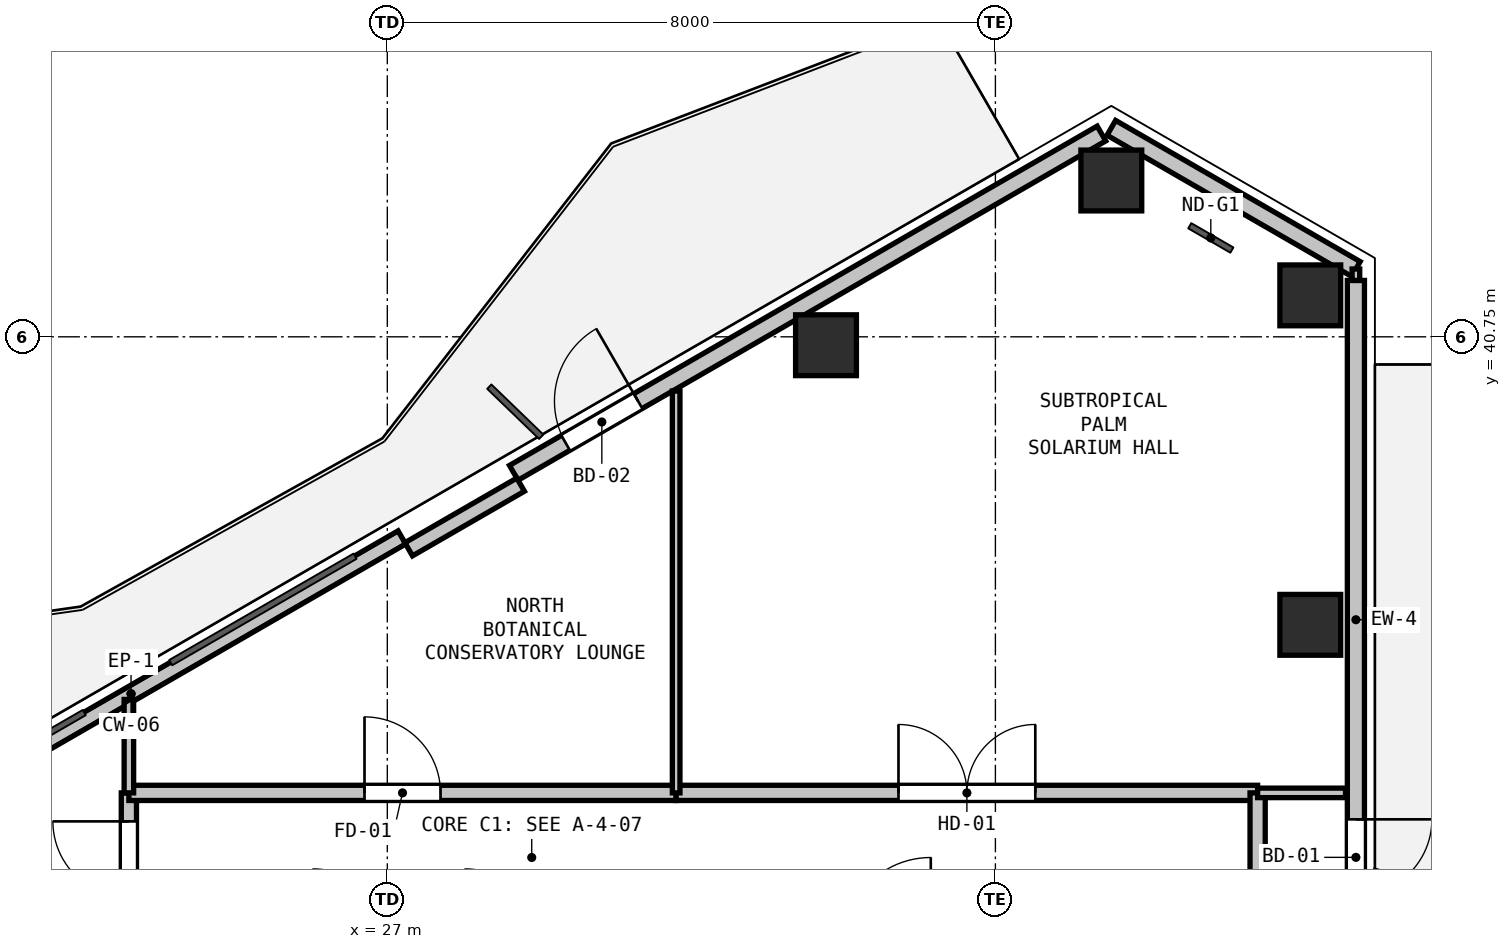
"""IFC4 building model, lengths in metres.
Left out: names, types, materials, properties, quantities, classifications, styles, units other than length and angle.
Written with IfcOpenShell. Run it as: python <this file> out.ifc"""

import sys

from ifc_helpers import new_model, si_unit, direction, frame, frame_2d, origin, origin_2d, place, context, subcontext, project, spatial, rectangle, hollow_rectangle, extrude, element, fill, save


model = new_model("IFC4")
c1 = context("Model", 3, precision=1e-05, world=origin(), true_north=direction((0.0, 1.0)))
c2 = subcontext(c1, "Body", "Model", "MODEL_VIEW")
j1 = project(units=[si_unit("LENGTHUNIT", "METRE"), si_unit("PLANEANGLEUNIT", "RADIAN")], contexts=[c1])
p1 = place(None, origin())
s1 = spatial("IfcSite", under=j1, at=p1, CompositionType="ELEMENT")
p2 = place(p1, origin())
s2 = spatial("IfcBuilding", under=s1, at=p2, CompositionType="ELEMENT")
p3 = place(p2, frame((0.0, 0.0, 249.6)))
s3 = spatial("IfcBuildingStorey", under=s2, at=p3, CompositionType="ELEMENT", Elevation=249.6)
for number, where, z_axis, x_axis in (
    (1, (32.771, 40.639, 0.0), (0.0, 0.0, 1.0), (1.0, 0.0, 0.0)),
    (2, (36.525, 42.807, 0.0), (0.0, 0.0, 1.0), (1.0, 0.0, 0.0)),
    (3, (39.143, 41.295, 0.0), (0.0, 0.0, 1.0), (1.0, 0.0, 0.0)),
    (4, (39.143, 36.961, 0.0), (0.0, 0.0, 1.0), (1.0, 0.0, 0.0)),
):
    element("IfcColumn", number, at=place(p3, frame(where, z_axis=z_axis, x_axis=x_axis)), inside=s3, PredefinedType="COLUMN", context=c2, shape_type="SweptSolid", body=[
        extrude(hollow_rectangle(XDim=0.8, YDim=0.8, WallThickness=0.025, at=origin_2d()), origin(), (0.0, 0.0, 1.0), 4.5),
    ])
p4 = place(p3, frame((36.525, 43.5, 0.0), z_axis=(0.0, 0.0, 1.0), x_axis=(0.866038962515, -0.499976514854, 0.0)))
e5 = element("IfcWall", 5, at=p4, inside=s3, PredefinedType="SOLIDWALL", context=c2, shape_type="SweptSolid", body=[
    extrude(rectangle(XDim=3.716, YDim=0.225, at=frame_2d((1.858, 0.0))), origin(), (0.0, 0.0, 1.0), 3.84),
])
p5 = place(p3, frame((20.066, 33.997, 0.0), z_axis=(0.0, 0.0, 1.0), x_axis=(0.866019557082, 0.500010126649, 0.0)))
e6 = element("IfcWall", 6, at=p5, inside=s3, PredefinedType="PARAPET", context=c2, shape_type="SweptSolid", body=[
    extrude(rectangle(XDim=8.228, YDim=0.2, at=frame_2d((4.114, 0.0))), origin(), (0.0, 0.0, 1.0), 0.2),
])
p6 = place(p3, frame((28.664, 38.96, 0.0), z_axis=(0.0, 0.0, 1.0), x_axis=(0.866026655105, 0.499997832642, 0.0)))
e7 = element("IfcWall", 7, at=p6, inside=s3, PredefinedType="SOLIDWALL", context=c2, shape_type="SweptSolid", body=[
    extrude(rectangle(XDim=8.928, YDim=0.225, at=frame_2d((4.464, 0.0))), origin(), (0.0, 0.0, 1.0), 3.84),
])
p7 = place(p6, frame((0.788, 0.0, 0.0)))
e8 = element("IfcOpeningElement", 8, at=p7, cuts=e7, PredefinedType="OPENING", context=c2, shape_type="SweptSolid", body=[
    extrude(rectangle(XDim=1.1, YDim=2.1, at=frame_2d((0.55, 1.05))), frame((0.0, 0.123, 0.0), z_axis=(0.0, -1.0, 0.0), x_axis=(1.0, 0.0, 0.0)), (0.0, 0.0, 1.0), 0.245),
])
p8 = place(p3, frame((27.281, 37.955, 0.0), z_axis=(0.0, 0.0, 1.0), x_axis=(0.866025371046, 0.500000056704, 0.0)))
e9 = element("IfcWall", 9, at=p8, inside=s3, PredefinedType="PARAPET", context=c2, shape_type="SweptSolid", body=[
    extrude(rectangle(XDim=1.7, YDim=0.2, at=frame_2d((0.85, 0.0))), origin(), (0.0, 0.0, 1.0), 3.84),
])
p9 = place(p3, frame((39.743, 41.492, 0.0), z_axis=(0.0, 0.0, 1.0), x_axis=(0.0, -1.0, 0.0)))
e10 = element("IfcWall", 10, at=p9, inside=s3, PredefinedType="SOLIDWALL", context=c2, shape_type="SweptSolid", body=[
    extrude(rectangle(XDim=8.928, YDim=0.225, at=frame_2d((4.464, 0.0))), origin(), (0.0, 0.0, 1.0), 3.84),
])
p10 = place(p9, frame((7.09, 0.0, 0.0)))
e11 = element("IfcOpeningElement", 11, at=p10, cuts=e10, PredefinedType="OPENING", context=c2, shape_type="SweptSolid", body=[
    extrude(rectangle(XDim=1.0, YDim=2.1, at=frame_2d((0.5, 1.05))), frame((0.0, 0.123, 0.0), z_axis=(0.0, -1.0, 0.0), x_axis=(1.0, 0.0, 0.0)), (0.0, 0.0, 1.0), 0.245),
])
p11 = place(p3, frame((23.6, 33.0, 0.0), z_axis=(0.0, 0.0, 1.0), x_axis=(0.0, 1.0, 0.0)))
e12 = element("IfcWall", 12, at=p11, inside=s3, PredefinedType="PARTITIONING", context=c2, shape_type="SweptSolid", body=[
    extrude(rectangle(XDim=1.75, YDim=0.2, at=frame_2d((0.875, 0.0))), origin(), (0.0, 0.0, 1.0), 3.745),
])
p12 = place(p11, frame((0.375, 0.0, 0.0)))
e13 = element("IfcOpeningElement", 13, at=p12, cuts=e12, PredefinedType="OPENING", context=c2, shape_type="SweptSolid", body=[
    extrude(rectangle(XDim=1.0, YDim=2.15, at=frame_2d((0.5, 1.075))), frame((0.0, 0.11, 0.0), z_axis=(0.0, -1.0, 0.0), x_axis=(1.0, 0.0, 0.0)), (0.0, 0.0, 1.0), 0.22),
])
p13 = place(p3, frame((23.6, 34.75, 0.0), z_axis=(0.0, 0.0, 1.0), x_axis=(1.0, 0.0, 0.0)))
e14 = element("IfcWall", 14, at=p13, inside=s3, PredefinedType="PARTITIONING", context=c2, shape_type="SweptSolid", body=[
    extrude(rectangle(XDim=7.2, YDim=0.2, at=frame_2d((3.6, 0.0))), origin(), (0.0, 0.0, 1.0), 4.22),
])
p14 = place(p13, frame((3.1, 0.0, 0.0)))
e15 = element("IfcOpeningElement", 15, at=p14, cuts=e14, PredefinedType="OPENING", context=c2, shape_type="SweptSolid", body=[
    extrude(rectangle(XDim=1.0, YDim=2.15, at=frame_2d((0.5, 1.075))), frame((0.0, 0.11, 0.0), z_axis=(0.0, -1.0, 0.0), x_axis=(1.0, 0.0, 0.0)), (0.0, 0.0, 1.0), 0.22),
])
p15 = place(p3, frame((30.8, 34.75, 0.0), z_axis=(0.0, 0.0, 1.0), x_axis=(1.0, 0.0, 0.0)))
e16 = element("IfcWall", 16, at=p15, inside=s3, PredefinedType="PARTITIONING", context=c2, shape_type="SweptSolid", body=[
    extrude(rectangle(XDim=7.65, YDim=0.2, at=frame_2d((3.825, 0.0))), origin(), (0.0, 0.0, 1.0), 3.668),
])
p16 = place(p15, frame((2.925, 0.0, 0.0)))
e17 = element("IfcOpeningElement", 17, at=p16, cuts=e16, PredefinedType="OPENING", context=c2, shape_type="SweptSolid", body=[
    extrude(rectangle(XDim=1.8, YDim=2.2, at=frame_2d((0.9, 1.1))), frame((0.0, 0.11, 0.0), z_axis=(0.0, -1.0, 0.0), x_axis=(1.0, 0.0, 0.0)), (0.0, 0.0, 1.0), 0.22),
])
p17 = place(p3, frame((38.45, 34.75, 0.0), z_axis=(0.0, 0.0, 1.0), x_axis=(0.0, -1.0, 0.0)))
e18 = element("IfcWall", 18, at=p17, inside=s3, PredefinedType="PARTITIONING", context=c2, shape_type="SweptSolid", body=[
    extrude(rectangle(XDim=16.0, YDim=0.2, at=frame_2d((8.0, 0.0))), origin(), (0.0, 0.0, 1.0), 4.22),
])
p18 = place(p17, frame((7.1, 0.0, 0.0)))
e19 = element("IfcOpeningElement", 19, at=p18, cuts=e18, PredefinedType="OPENING", context=c2, shape_type="SweptSolid", body=[
    extrude(rectangle(XDim=1.8, YDim=2.2, at=frame_2d((0.9, 1.1))), frame((0.0, 0.11, 0.0), z_axis=(0.0, -1.0, 0.0), x_axis=(1.0, 0.0, 0.0)), (0.0, 0.0, 1.0), 0.22),
])
p19 = place(p3, frame((23.6, 34.75, 0.0), z_axis=(0.0, 0.0, 1.0), x_axis=(0.0, 1.0, 0.0)))
e20 = element("IfcWall", 20, at=p19, inside=s3, PredefinedType="PARTITIONING", context=c2, shape_type="SweptSolid", body=[
    extrude(rectangle(XDim=1.229, YDim=0.125, at=frame_2d((0.615, 0.0))), origin(), (0.0, 0.0, 1.0), 2.365),
])
p20 = place(p3, frame((30.8, 40.036, 0.0), z_axis=(0.0, 0.0, 1.0), x_axis=(0.0, -1.0, 0.0)))
e21 = element("IfcWall", 21, at=p20, inside=s3, PredefinedType="PARTITIONING", context=c2, shape_type="SweptSolid", body=[
    extrude(rectangle(XDim=5.286, YDim=0.1, at=frame_2d((2.643, 0.0))), origin(), (0.0, 0.0, 1.0), 2.365),
])
p21 = place(p3, frame((39.606, 34.75, 0.0), z_axis=(0.0, 0.0, 1.0), x_axis=(-1.0, 0.0, 0.0)))
e22 = element("IfcWall", 22, at=p21, inside=s3, PredefinedType="PARTITIONING", context=c2, shape_type="SweptSolid", body=[
    extrude(rectangle(XDim=1.156, YDim=0.125, at=frame_2d((0.578, 0.0))), origin(), (0.0, 0.0, 1.0), 2.365),
])
p22 = place(p3, frame((39.743, 41.642, 0.0), z_axis=(0.0, 0.0, 1.0), x_axis=(0.0, -1.0, 0.0)))
e23 = element("IfcWall", 23, at=p22, inside=s3, PredefinedType="PARTITIONING", context=c2, shape_type="SweptSolid", body=[
    extrude(rectangle(XDim=0.15, YDim=0.1, at=frame_2d((0.075, 0.0))), origin(), (0.0, 0.0, 1.0), 4.22),
])
p23 = place(p7, origin())
e24 = element("IfcDoor", 24, at=p23, inside=s3, OperationType="SINGLE_SWING_RIGHT", PredefinedType="DOOR", context=c2, shape_type="SweptSolid", body=[
    extrude(rectangle(XDim=1.1, YDim=2.1, at=frame_2d((0.55, 1.05))), frame((0.0, 0.025, 0.0), z_axis=(0.0, -1.0, 0.0), x_axis=(1.0, 0.0, 0.0)), (0.0, 0.0, 1.0), 0.05),
])
fill(e8, e24)
p24 = place(p10, origin())
e25 = element("IfcDoor", 25, at=p24, inside=s3, OperationType="SINGLE_SWING_LEFT", PredefinedType="DOOR", context=c2, shape_type="SweptSolid", body=[
    extrude(rectangle(XDim=1.0, YDim=2.1, at=frame_2d((0.5, 1.05))), frame((0.0, 0.025, 0.0), z_axis=(0.0, -1.0, 0.0), x_axis=(1.0, 0.0, 0.0)), (0.0, 0.0, 1.0), 0.05),
])
fill(e11, e25)
p25 = place(p14, origin())
e26 = element("IfcDoor", 26, at=p25, inside=s3, OperationType="SINGLE_SWING_LEFT", PredefinedType="DOOR", context=c2, shape_type="SweptSolid", body=[
    extrude(rectangle(XDim=1.0, YDim=2.15, at=frame_2d((0.5, 1.075))), frame((0.0, 0.025, 0.0), z_axis=(0.0, -1.0, 0.0), x_axis=(1.0, 0.0, 0.0)), (0.0, 0.0, 1.0), 0.05),
])
fill(e15, e26)
p26 = place(p16, origin())
e27 = element("IfcDoor", 27, at=p26, inside=s3, OperationType="DOUBLE_DOOR_SINGLE_SWING", PredefinedType="DOOR", context=c2, shape_type="SweptSolid", body=[
    extrude(rectangle(XDim=1.8, YDim=2.2, at=frame_2d((0.9, 1.1))), frame((0.0, 0.025, 0.0), z_axis=(0.0, -1.0, 0.0), x_axis=(1.0, 0.0, 0.0)), (0.0, 0.0, 1.0), 0.05),
])
fill(e17, e27)
p27 = place(p12, origin())
e28 = element("IfcDoor", 28, at=p27, inside=s3, OperationType="SINGLE_SWING_RIGHT", PredefinedType="DOOR", context=c2, shape_type="SweptSolid", body=[
    extrude(rectangle(XDim=1.0, YDim=2.15, at=frame_2d((0.5, 1.075))), frame((0.0, 0.025, 0.0), z_axis=(0.0, -1.0, 0.0), x_axis=(1.0, 0.0, 0.0)), (0.0, 0.0, 1.0), 0.05),
])
fill(e13, e28)
save(model, sys.argv[1])
